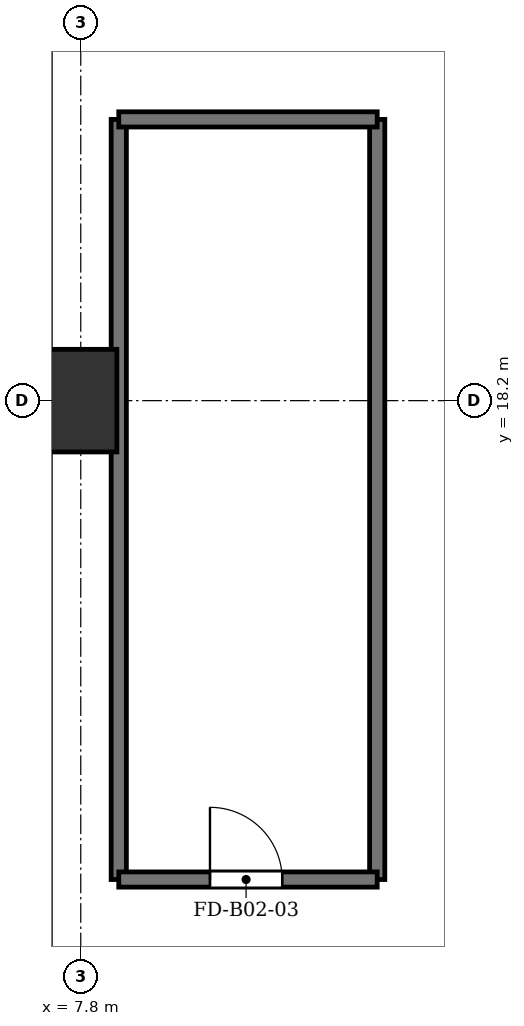
"""IFC4 building model, lengths in metres.
Left out: names, types, materials, properties, quantities, classifications, styles, units other than length and angle.
Written with IfcOpenShell. Run it as: python <this file> out.ifc"""

import sys

from ifc_helpers import new_model, si_unit, direction, frame, frame_2d, origin, origin_2d, place, context, subcontext, project, spatial, rectangle, extrude, source, transform, mapped, element, fill, save


model = new_model("IFC4")
c1 = context("Model", 3, precision=1e-05, world=origin(), true_north=direction((0.0, 1.0)))
c2 = subcontext(c1, "Body", "Model", "MODEL_VIEW")
j1 = project(units=[si_unit("LENGTHUNIT", "METRE"), si_unit("PLANEANGLEUNIT", "RADIAN")], contexts=[c1])
p1 = place(None, origin())
s1 = spatial("IfcSite", under=j1, at=p1, CompositionType="ELEMENT")
p2 = place(p1, origin())
s2 = spatial("IfcBuilding", under=s1, at=p2, CompositionType="ELEMENT")
p3 = place(p2, frame((0.0, 0.0, -8.6)))
s3 = spatial("IfcBuildingStorey", under=s2, at=p3, CompositionType="ELEMENT", Elevation=-8.6)
m1 = source(origin(), c2, "Body", "SweptSolid", [
    extrude(rectangle(XDim=1.35, YDim=1.35, at=origin_2d()), origin(), (0.0, 0.0, 1.0), 4.3),
])
p4 = place(p3, frame((7.6, 18.2, 0.0), z_axis=(0.0, 0.0, 1.0), x_axis=(1.0, 0.0, 0.0)))
e1 = element("IfcColumn", 1, at=p4, inside=s3, PredefinedType="COLUMN", context=c2, shape_type="MappedRepresentation", body=[
    mapped(m1, transform((0.0, 0.0, 0.0), x_axis=(1.0, 0.0, 0.0), y_axis=(0.0, 1.0, 0.0), z_axis=(0.0, 0.0, 1.0), scale=1.0)),
])
for number, where, z_axis, x_axis in (
    (2, (8.3, 11.9, 0.0), (0.0, 0.0, 1.0), (0.0, 1.0, 0.0)),
    (3, (11.7, 11.9, 0.0), (0.0, 0.0, 1.0), (0.0, 1.0, 0.0)),
):
    element("IfcWall", number, at=place(p3, frame(where, z_axis=z_axis, x_axis=x_axis)), inside=s3, PredefinedType="SHEAR", context=c2, shape_type="SweptSolid", body=[
        extrude(rectangle(XDim=10.0, YDim=0.2, at=frame_2d((5.0, 0.0))), origin(), (0.0, 0.0, 1.0), 3.98),
    ])
p5 = place(p3, frame((8.3, 11.9, 0.0), z_axis=(0.0, 0.0, 1.0), x_axis=(1.0, 0.0, 0.0)))
e4 = element("IfcWall", 4, at=p5, inside=s3, PredefinedType="SHEAR", context=c2, shape_type="SweptSolid", body=[
    extrude(rectangle(XDim=3.4, YDim=0.2, at=frame_2d((1.7, 0.0))), origin(), (0.0, 0.0, 1.0), 3.98),
])
p6 = place(p5, frame((1.2, 0.0, 0.0)))
e5 = element("IfcOpeningElement", 5, at=p6, cuts=e4, PredefinedType="OPENING", context=c2, shape_type="SweptSolid", body=[
    extrude(rectangle(XDim=0.95, YDim=2.15, at=frame_2d((0.475, 1.075))), frame((0.0, 0.11, 0.0), z_axis=(0.0, -1.0, 0.0), x_axis=(1.0, 0.0, 0.0)), (0.0, 0.0, 1.0), 0.22),
])
p7 = place(p3, frame((8.3, 21.9, 0.0), z_axis=(0.0, 0.0, 1.0), x_axis=(1.0, 0.0, 0.0)))
e6 = element("IfcWall", 6, at=p7, inside=s3, PredefinedType="SHEAR", context=c2, shape_type="SweptSolid", body=[
    extrude(rectangle(XDim=3.4, YDim=0.2, at=frame_2d((1.7, 0.0))), origin(), (0.0, 0.0, 1.0), 3.98),
])
m2 = source(origin(), c2, "Body", "SweptSolid", [
    extrude(rectangle(XDim=0.95, YDim=2.15, at=frame_2d((0.475, 1.075))), frame((0.0, 0.025, 0.0), z_axis=(0.0, -1.0, 0.0), x_axis=(1.0, 0.0, 0.0)), (0.0, 0.0, 1.0), 0.05),
])
p8 = place(p6, origin())
e7 = element("IfcDoor", 7, at=p8, inside=s3, OperationType="SINGLE_SWING_LEFT", PredefinedType="DOOR", context=c2, shape_type="MappedRepresentation", body=[
    mapped(m2, transform((0.0, 0.0, 0.0), x_axis=(1.0, 0.0, 0.0), y_axis=(0.0, 1.0, 0.0), z_axis=(0.0, 0.0, 1.0), scale=1.0)),
])
fill(e5, e7)
save(model, sys.argv[1])
